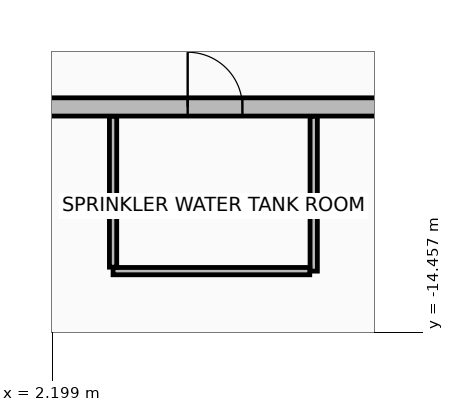
"""IFC4 building model, lengths in metres.
Left out: names, types, materials, properties, quantities, classifications, styles, units other than length and angle.
Written with IfcOpenShell. Run it as: python <this file> out.ifc"""

import sys

from ifc_helpers import new_model, si_unit, direction, frame, frame_2d, origin, place, context, subcontext, project, spatial, rectangle, extrude, element, fill, save


model = new_model("IFC4")
c1 = context("Model", 3, precision=1e-05, world=origin(), true_north=direction((0.0, 1.0)))
c2 = subcontext(c1, "Body", "Model", "MODEL_VIEW")
j1 = project(units=[si_unit("LENGTHUNIT", "METRE"), si_unit("PLANEANGLEUNIT", "RADIAN")], contexts=[c1])
p1 = place(None, origin())
s1 = spatial("IfcSite", under=j1, at=p1, CompositionType="ELEMENT")
p2 = place(p1, origin())
s2 = spatial("IfcBuilding", under=s1, at=p2, CompositionType="ELEMENT")
p3 = place(p2, frame((0.0, 0.0, 81.1)))
s3 = spatial("IfcBuildingStorey", under=s2, at=p3, CompositionType="ELEMENT", Elevation=81.1)
p4 = place(p3, frame((-12.05, -10.75, 0.0), z_axis=(0.0, 0.0, 1.0), x_axis=(1.0, 0.0, 0.0)))
e1 = element("IfcWall", 1, at=p4, inside=s3, PredefinedType="STANDARD", context=c2, shape_type="SweptSolid", body=[
    extrude(rectangle(XDim=24.1, YDim=0.3, at=frame_2d((12.05, 0.0))), origin(), (0.0, 0.0, 1.0), 2.605),
])
p5 = place(p4, frame((10.95, 0.0, 0.0)))
e2 = element("IfcOpeningElement", 2, at=p5, cuts=e1, PredefinedType="OPENING", context=c2, shape_type="SweptSolid", body=[
    extrude(rectangle(XDim=1.8, YDim=2.3, at=frame_2d((0.9, 1.15))), frame((0.0, 0.16, 0.0), z_axis=(0.0, -1.0, 0.0), x_axis=(1.0, 0.0, 0.0)), (0.0, 0.0, 1.0), 0.32),
])
p6 = place(p4, frame((8.3, 0.0, 0.0)))
e3 = element("IfcOpeningElement", 3, at=p6, cuts=e1, PredefinedType="OPENING", context=c2, shape_type="SweptSolid", body=[
    extrude(rectangle(XDim=1.1, YDim=2.15, at=frame_2d((0.55, 1.075))), frame((0.0, 0.16, 0.0), z_axis=(0.0, -1.0, 0.0), x_axis=(1.0, 0.0, 0.0)), (0.0, 0.0, 1.0), 0.32),
])
p7 = place(p4, frame((16.477, 0.0, 0.0)))
e4 = element("IfcOpeningElement", 4, at=p7, cuts=e1, PredefinedType="OPENING", context=c2, shape_type="SweptSolid", body=[
    extrude(rectangle(XDim=0.9, YDim=2.1, at=frame_2d((0.45, 1.05))), frame((0.0, 0.16, 0.0), z_axis=(0.0, -1.0, 0.0), x_axis=(1.0, 0.0, 0.0)), (0.0, 0.0, 1.0), 0.32),
])
p8 = place(p3, frame((6.5, -10.905, 0.0), z_axis=(0.0, 0.0, 1.0), x_axis=(0.0, -1.0, 0.0)))
e5 = element("IfcWall", 5, at=p8, inside=s3, PredefinedType="PARTITIONING", context=c2, shape_type="SweptSolid", body=[
    extrude(rectangle(XDim=2.545, YDim=0.12, at=frame_2d((1.272, 0.0))), origin(), (0.0, 0.0, 1.0), 4.81),
])
p9 = place(p3, frame((6.435, -13.45, 0.0), z_axis=(0.0, 0.0, 1.0), x_axis=(-1.0, 0.0, 0.0)))
e6 = element("IfcWall", 6, at=p9, inside=s3, PredefinedType="PARTITIONING", context=c2, shape_type="SweptSolid", body=[
    extrude(rectangle(XDim=3.235, YDim=0.12, at=frame_2d((1.618, 0.0))), origin(), (0.0, 0.0, 1.0), 4.81),
])
p10 = place(p3, frame((3.2, -13.385, 0.0), z_axis=(0.0, 0.0, 1.0), x_axis=(0.0, 1.0, 0.0)))
e7 = element("IfcWall", 7, at=p10, inside=s3, PredefinedType="PARTITIONING", context=c2, shape_type="SweptSolid", body=[
    extrude(rectangle(XDim=2.48, YDim=0.12, at=frame_2d((1.24, 0.0))), origin(), (0.0, 0.0, 1.0), 4.81),
])
p11 = place(p7, origin())
e8 = element("IfcDoor", 8, at=p11, inside=s3, OperationType="SINGLE_SWING_LEFT", PredefinedType="DOOR", context=c2, shape_type="SweptSolid", body=[
    extrude(rectangle(XDim=0.9, YDim=2.1, at=frame_2d((0.45, 1.05))), frame((0.0, 0.025, 0.0), z_axis=(0.0, -1.0, 0.0), x_axis=(1.0, 0.0, 0.0)), (0.0, 0.0, 1.0), 0.05),
])
fill(e4, e8)
save(model, sys.argv[1])
